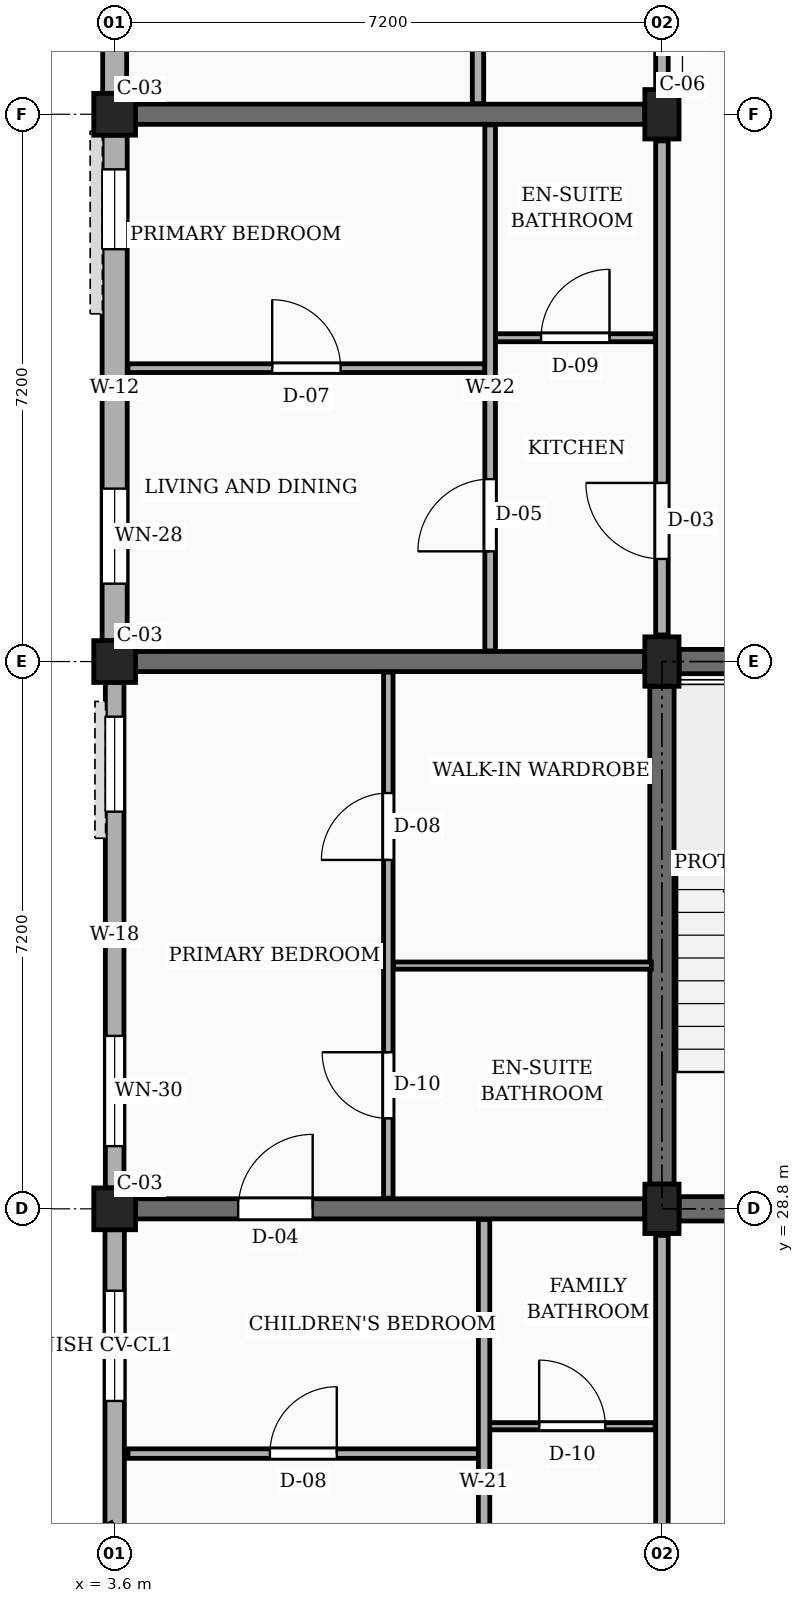
"""IFC4 building model, lengths in metres.
Left out: names, types, materials, properties, quantities, classifications, styles, units other than length and angle.
Written with IfcOpenShell. Run it as: python <this file> out.ifc"""

import sys

from ifc_helpers import new_model, si_unit, direction, frame, frame_2d, origin, origin_2d, place, context, subcontext, project, spatial, rectangle, extrude, element, fill, save


model = new_model("IFC4")
c1 = context("Model", 3, precision=1e-05, world=origin(), true_north=direction((0.0, 1.0)))
c2 = subcontext(c1, "Body", "Model", "MODEL_VIEW")
j1 = project(units=[si_unit("LENGTHUNIT", "METRE"), si_unit("PLANEANGLEUNIT", "RADIAN")], contexts=[c1])
p1 = place(None, origin())
s1 = spatial("IfcSite", under=j1, at=p1, CompositionType="ELEMENT")
p2 = place(p1, origin())
s2 = spatial("IfcBuilding", under=s1, at=p2, CompositionType="ELEMENT")
p3 = place(p2, frame((0.0, 0.0, 10.8)))
s3 = spatial("IfcBuildingStorey", under=s2, at=p3, CompositionType="ELEMENT", Elevation=10.8)
for number, where, z_axis, x_axis in (
    (1, (3.6, 28.8, 0.0), (0.0, 0.0, 1.0), (1.0, 0.0, 0.0)),
    (2, (3.6, 36.0, 0.0), (0.0, 0.0, 1.0), (1.0, 0.0, 0.0)),
    (3, (3.6, 43.2, 0.0), (0.0, 0.0, 1.0), (1.0, 0.0, 0.0)),
):
    element("IfcColumn", number, at=place(p3, frame(where, z_axis=z_axis, x_axis=x_axis)), inside=s3, PredefinedType="COLUMN", context=c2, shape_type="SweptSolid", body=[
        extrude(rectangle(XDim=0.55, YDim=0.55, at=origin_2d()), origin(), (0.0, 0.0, 1.0), 3.15),
    ])
for number, where, z_axis, x_axis in (
    (4, (10.8, 28.8, 0.0), (0.0, 0.0, 1.0), (1.0, 0.0, 0.0)),
    (5, (10.8, 36.0, 0.0), (0.0, 0.0, 1.0), (1.0, 0.0, 0.0)),
    (6, (10.8, 43.2, 0.0), (0.0, 0.0, 1.0), (1.0, 0.0, 0.0)),
):
    element("IfcColumn", number, at=place(p3, frame(where, z_axis=z_axis, x_axis=x_axis)), inside=s3, PredefinedType="COLUMN", context=c2, shape_type="SweptSolid", body=[
        extrude(rectangle(XDim=0.45, YDim=0.65, at=origin_2d()), origin(), (0.0, 0.0, 1.0), 3.15),
    ])
p4 = place(p3, frame((3.875, 28.8, 0.0), z_axis=(0.0, 0.0, 1.0), x_axis=(1.0, 0.0, 0.0)))
e7 = element("IfcWall", 7, at=p4, inside=s3, PredefinedType="SOLIDWALL", context=c2, shape_type="SweptSolid", body=[
    extrude(rectangle(XDim=6.7, YDim=0.265, at=frame_2d((3.35, 0.0))), origin(), (0.0, 0.0, 1.0), 2.17),
])
p5 = place(p4, frame((1.35, 0.0, 0.0)))
e8 = element("IfcOpeningElement", 8, at=p5, cuts=e7, PredefinedType="OPENING", context=c2, shape_type="SweptSolid", body=[
    extrude(rectangle(XDim=0.98, YDim=2.12, at=frame_2d((0.49, 1.06))), frame((0.0, 0.143, 0.0), z_axis=(0.0, -1.0, 0.0), x_axis=(1.0, 0.0, 0.0)), (0.0, 0.0, 1.0), 0.285),
])
for number, where, z_axis, x_axis in (
    (9, (3.875, 36.0, 0.0), (0.0, 0.0, 1.0), (1.0, 0.0, 0.0)),
    (10, (3.875, 43.2, 0.0), (0.0, 0.0, 1.0), (1.0, 0.0, 0.0)),
):
    element("IfcWall", number, at=place(p3, frame(where, z_axis=z_axis, x_axis=x_axis)), inside=s3, PredefinedType="SOLIDWALL", context=c2, shape_type="SweptSolid", body=[
        extrude(rectangle(XDim=6.7, YDim=0.265, at=frame_2d((3.35, 0.0))), origin(), (0.0, 0.0, 1.0), 2.17),
    ])
p6 = place(p3, frame((3.6, 50.125, 0.0), z_axis=(0.0, 0.0, 1.0), x_axis=(0.0, -1.0, 0.0)))
e11 = element("IfcWall", 11, at=p6, inside=s3, PredefinedType="SOLIDWALL", context=c2, shape_type="SweptSolid", body=[
    extrude(rectangle(XDim=6.65, YDim=0.315, at=frame_2d((3.325, 0.0))), origin(), (0.0, 0.0, 1.0), 2.44),
])
p7 = place(p6, frame((0.45, 0.0, 0.78)))
e12 = element("IfcOpeningElement", 12, at=p7, cuts=e11, PredefinedType="OPENING", context=c2, shape_type="SweptSolid", body=[
    extrude(rectangle(XDim=1.46, YDim=1.36, at=frame_2d((0.73, 0.68))), frame((0.0, 0.167, 0.0), z_axis=(0.0, -1.0, 0.0), x_axis=(1.0, 0.0, 0.0)), (0.0, 0.0, 1.0), 0.335),
])
p8 = place(p6, frame((4.65, 0.0, 0.78)))
e13 = element("IfcOpeningElement", 13, at=p8, cuts=e11, PredefinedType="OPENING", context=c2, shape_type="SweptSolid", body=[
    extrude(rectangle(XDim=1.05, YDim=1.44, at=frame_2d((0.525, 0.72))), frame((0.0, 0.167, 0.0), z_axis=(0.0, -1.0, 0.0), x_axis=(1.0, 0.0, 0.0)), (0.0, 0.0, 1.0), 0.335),
])
p9 = place(p3, frame((3.6, 42.925, 0.0), z_axis=(0.0, 0.0, 1.0), x_axis=(0.0, -1.0, 0.0)))
e14 = element("IfcWall", 14, at=p9, inside=s3, PredefinedType="SOLIDWALL", context=c2, shape_type="SweptSolid", body=[
    extrude(rectangle(XDim=6.65, YDim=0.33, at=frame_2d((3.325, 0.0))), origin(), (0.0, 0.0, 1.0), 2.44),
])
p10 = place(p9, frame((0.45, 0.0, 0.78)))
e15 = element("IfcOpeningElement", 15, at=p10, cuts=e14, PredefinedType="OPENING", context=c2, shape_type="SweptSolid", body=[
    extrude(rectangle(XDim=1.05, YDim=1.44, at=frame_2d((0.525, 0.72))), frame((0.0, 0.175, 0.0), z_axis=(0.0, -1.0, 0.0), x_axis=(1.0, 0.0, 0.0)), (0.0, 0.0, 1.0), 0.35),
])
p11 = place(p9, frame((4.65, 0.0, 0.78)))
e16 = element("IfcOpeningElement", 16, at=p11, cuts=e14, PredefinedType="OPENING", context=c2, shape_type="SweptSolid", body=[
    extrude(rectangle(XDim=1.25, YDim=1.44, at=frame_2d((0.625, 0.72))), frame((0.0, 0.175, 0.0), z_axis=(0.0, -1.0, 0.0), x_axis=(1.0, 0.0, 0.0)), (0.0, 0.0, 1.0), 0.35),
])
p12 = place(p3, frame((3.6, 35.725, 0.0), z_axis=(0.0, 0.0, 1.0), x_axis=(0.0, -1.0, 0.0)))
e17 = element("IfcWall", 17, at=p12, inside=s3, PredefinedType="SOLIDWALL", context=c2, shape_type="SweptSolid", body=[
    extrude(rectangle(XDim=6.65, YDim=0.245, at=frame_2d((3.325, 0.0))), origin(), (0.0, 0.0, 1.0), 2.44),
])
p13 = place(p12, frame((0.45, 0.0, 0.78)))
e18 = element("IfcOpeningElement", 18, at=p13, cuts=e17, PredefinedType="OPENING", context=c2, shape_type="SweptSolid", body=[
    extrude(rectangle(XDim=1.25, YDim=1.44, at=frame_2d((0.625, 0.72))), frame((0.0, 0.133, 0.0), z_axis=(0.0, -1.0, 0.0), x_axis=(1.0, 0.0, 0.0)), (0.0, 0.0, 1.0), 0.265),
])
p14 = place(p12, frame((4.65, 0.0, 0.78)))
e19 = element("IfcOpeningElement", 19, at=p14, cuts=e17, PredefinedType="OPENING", context=c2, shape_type="SweptSolid", body=[
    extrude(rectangle(XDim=1.45, YDim=1.44, at=frame_2d((0.725, 0.72))), frame((0.0, 0.133, 0.0), z_axis=(0.0, -1.0, 0.0), x_axis=(1.0, 0.0, 0.0)), (0.0, 0.0, 1.0), 0.265),
])
p15 = place(p3, frame((3.6, 28.525, 0.0), z_axis=(0.0, 0.0, 1.0), x_axis=(0.0, -1.0, 0.0)))
e20 = element("IfcWall", 20, at=p15, inside=s3, PredefinedType="SOLIDWALL", context=c2, shape_type="SweptSolid", body=[
    extrude(rectangle(XDim=3.905, YDim=0.255, at=frame_2d((1.952, 0.0))), origin(), (0.0, 0.0, 1.0), 2.44),
])
p16 = place(p15, frame((0.802, 0.0, 0.78)))
e21 = element("IfcOpeningElement", 21, at=p16, cuts=e20, PredefinedType="OPENING", context=c2, shape_type="SweptSolid", body=[
    extrude(rectangle(XDim=1.45, YDim=1.44, at=frame_2d((0.725, 0.72))), frame((0.0, 0.137, 0.0), z_axis=(0.0, -1.0, 0.0), x_axis=(1.0, 0.0, 0.0)), (0.0, 0.0, 1.0), 0.275),
])
p17 = place(p3, frame((10.8, 29.125, 0.0), z_axis=(0.0, 0.0, 1.0), x_axis=(0.0, 1.0, 0.0)))
e22 = element("IfcWall", 22, at=p17, inside=s3, PredefinedType="SHEAR", context=c2, shape_type="SweptSolid", body=[
    extrude(rectangle(XDim=6.55, YDim=0.32, at=frame_2d((3.275, 0.0))), origin(), (0.0, 0.0, 1.0), 2.87),
])
for number, where, z_axis, x_axis in (
    (23, (11.025, 36.0, 0.0), (0.0, 0.0, 1.0), (1.0, 0.0, 0.0)),
    (24, (11.025, 28.8, 0.0), (0.0, 0.0, 1.0), (1.0, 0.0, 0.0)),
):
    element("IfcWall", number, at=place(p3, frame(where, z_axis=z_axis, x_axis=x_axis)), inside=s3, PredefinedType="SHEAR", context=c2, shape_type="SweptSolid", body=[
        extrude(rectangle(XDim=6.75, YDim=0.32, at=frame_2d((3.375, 0.0))), origin(), (0.0, 0.0, 1.0), 2.87),
    ])
p18 = place(p3, frame((10.8, 21.95, 0.0), z_axis=(0.0, 0.0, 1.0), x_axis=(0.0, 1.0, 0.0)))
e25 = element("IfcWall", 25, at=p18, inside=s3, PredefinedType="PARTITIONING", context=c2, shape_type="SweptSolid", body=[
    extrude(rectangle(XDim=6.5, YDim=0.165, at=frame_2d((3.25, 0.0))), origin(), (0.0, 0.0, 1.0), 2.22),
])
p19 = place(p18, frame((1.0, 0.0, 0.0)))
e26 = element("IfcOpeningElement", 26, at=p19, cuts=e25, PredefinedType="OPENING", context=c2, shape_type="SweptSolid", body=[
    extrude(rectangle(XDim=1.14, YDim=2.18, at=frame_2d((0.57, 1.09))), frame((0.0, 0.093, 0.0), z_axis=(0.0, -1.0, 0.0), x_axis=(1.0, 0.0, 0.0)), (0.0, 0.0, 1.0), 0.185),
])
p20 = place(p3, frame((10.8, 36.35, 0.0), z_axis=(0.0, 0.0, 1.0), x_axis=(0.0, 1.0, 0.0)))
e27 = element("IfcWall", 27, at=p20, inside=s3, PredefinedType="PARTITIONING", context=c2, shape_type="SweptSolid", body=[
    extrude(rectangle(XDim=6.5, YDim=0.165, at=frame_2d((3.25, 0.0))), origin(), (0.0, 0.0, 1.0), 2.22),
])
p21 = place(p20, frame((1.0, 0.0, 0.0)))
e28 = element("IfcOpeningElement", 28, at=p21, cuts=e27, PredefinedType="OPENING", context=c2, shape_type="SweptSolid", body=[
    extrude(rectangle(XDim=1.0, YDim=2.15, at=frame_2d((0.5, 1.075))), frame((0.0, 0.093, 0.0), z_axis=(0.0, -1.0, 0.0), x_axis=(1.0, 0.0, 0.0)), (0.0, 0.0, 1.0), 0.185),
])
p22 = place(p3, frame((10.8, 43.55, 0.0), z_axis=(0.0, 0.0, 1.0), x_axis=(0.0, 1.0, 0.0)))
e29 = element("IfcWall", 29, at=p22, inside=s3, PredefinedType="PARTITIONING", context=c2, shape_type="SweptSolid", body=[
    extrude(rectangle(XDim=6.5, YDim=0.165, at=frame_2d((3.25, 0.0))), origin(), (0.0, 0.0, 1.0), 2.22),
])
p23 = place(p22, frame((1.0, 0.0, 0.0)))
e30 = element("IfcOpeningElement", 30, at=p23, cuts=e29, PredefinedType="OPENING", context=c2, shape_type="SweptSolid", body=[
    extrude(rectangle(XDim=0.94, YDim=2.12, at=frame_2d((0.47, 1.06))), frame((0.0, 0.093, 0.0), z_axis=(0.0, -1.0, 0.0), x_axis=(1.0, 0.0, 0.0)), (0.0, 0.0, 1.0), 0.185),
])
p24 = place(p3, frame((3.775, 25.58, 0.0), z_axis=(0.0, 0.0, 1.0), x_axis=(1.0, 0.0, 0.0)))
e31 = element("IfcWall", 31, at=p24, inside=s3, PredefinedType="PARTITIONING", context=c2, shape_type="SweptSolid", body=[
    extrude(rectangle(XDim=4.615, YDim=0.125, at=frame_2d((2.308, 0.0))), origin(), (0.0, 0.0, 1.0), 2.305),
])
p25 = place(p24, frame((1.867, 0.0, 0.0)))
e32 = element("IfcOpeningElement", 32, at=p25, cuts=e31, PredefinedType="OPENING", context=c2, shape_type="SweptSolid", body=[
    extrude(rectangle(XDim=0.88, YDim=2.08, at=frame_2d((0.44, 1.04))), frame((0.0, 0.073, 0.0), z_axis=(0.0, -1.0, 0.0), x_axis=(1.0, 0.0, 0.0)), (0.0, 0.0, 1.0), 0.145),
])
p26 = place(p3, frame((8.53, 25.94, 0.0), z_axis=(0.0, 0.0, 1.0), x_axis=(1.0, 0.0, 0.0)))
e33 = element("IfcWall", 33, at=p26, inside=s3, PredefinedType="PARTITIONING", context=c2, shape_type="SweptSolid", body=[
    extrude(rectangle(XDim=2.18, YDim=0.095, at=frame_2d((1.09, 0.0))), origin(), (0.0, 0.0, 1.0), 2.305),
])
p27 = place(p26, frame((0.655, 0.0, 0.0)))
e34 = element("IfcOpeningElement", 34, at=p27, cuts=e33, PredefinedType="OPENING", context=c2, shape_type="SweptSolid", body=[
    extrude(rectangle(XDim=0.87, YDim=2.05, at=frame_2d((0.435, 1.025))), frame((0.0, 0.058, 0.0), z_axis=(0.0, -1.0, 0.0), x_axis=(1.0, 0.0, 0.0)), (0.0, 0.0, 1.0), 0.115),
])
p28 = place(p3, frame((8.46, 21.74, 0.0), z_axis=(0.0, 0.0, 1.0), x_axis=(0.0, 1.0, 0.0)))
e35 = element("IfcWall", 35, at=p28, inside=s3, PredefinedType="PARTITIONING", context=c2, shape_type="SweptSolid", body=[
    extrude(rectangle(XDim=6.92, YDim=0.15, at=frame_2d((3.46, 0.0))), origin(), (0.0, 0.0, 1.0), 2.305),
])
p29 = place(p28, frame((1.31, 0.0, 0.0)))
e36 = element("IfcOpeningElement", 36, at=p29, cuts=e35, PredefinedType="OPENING", context=c2, shape_type="SweptSolid", body=[
    extrude(rectangle(XDim=0.92, YDim=2.1, at=frame_2d((0.46, 1.05))), frame((0.0, 0.085, 0.0), z_axis=(0.0, -1.0, 0.0), x_axis=(1.0, 0.0, 0.0)), (0.0, 0.0, 1.0), 0.17),
])
p30 = place(p3, frame((7.2, 28.94, 0.0), z_axis=(0.0, 0.0, 1.0), x_axis=(0.0, 1.0, 0.0)))
e37 = element("IfcWall", 37, at=p30, inside=s3, PredefinedType="PARTITIONING", context=c2, shape_type="SweptSolid", body=[
    extrude(rectangle(XDim=6.92, YDim=0.125, at=frame_2d((3.46, 0.0))), origin(), (0.0, 0.0, 1.0), 2.305),
])
p31 = place(p30, frame((1.05, 0.0, 0.0)))
e38 = element("IfcOpeningElement", 38, at=p31, cuts=e37, PredefinedType="OPENING", context=c2, shape_type="SweptSolid", body=[
    extrude(rectangle(XDim=0.87, YDim=2.05, at=frame_2d((0.435, 1.025))), frame((0.0, 0.073, 0.0), z_axis=(0.0, -1.0, 0.0), x_axis=(1.0, 0.0, 0.0)), (0.0, 0.0, 1.0), 0.145),
])
p32 = place(p30, frame((4.45, 0.0, 0.0)))
e39 = element("IfcOpeningElement", 39, at=p32, cuts=e37, PredefinedType="OPENING", context=c2, shape_type="SweptSolid", body=[
    extrude(rectangle(XDim=0.88, YDim=2.08, at=frame_2d((0.44, 1.04))), frame((0.0, 0.073, 0.0), z_axis=(0.0, -1.0, 0.0), x_axis=(1.0, 0.0, 0.0)), (0.0, 0.0, 1.0), 0.145),
])
p33 = place(p3, frame((7.27, 32.0, 0.0), z_axis=(0.0, 0.0, 1.0), x_axis=(1.0, 0.0, 0.0)))
e40 = element("IfcWall", 40, at=p33, inside=s3, PredefinedType="PARTITIONING", context=c2, shape_type="SweptSolid", body=[
    extrude(rectangle(XDim=3.39, YDim=0.095, at=frame_2d((1.695, 0.0))), origin(), (0.0, 0.0, 1.0), 2.305),
])
p34 = place(p3, frame((3.775, 39.86, 0.0), z_axis=(0.0, 0.0, 1.0), x_axis=(1.0, 0.0, 0.0)))
e41 = element("IfcWall", 41, at=p34, inside=s3, PredefinedType="PARTITIONING", context=c2, shape_type="SweptSolid", body=[
    extrude(rectangle(XDim=4.695, YDim=0.115, at=frame_2d((2.348, 0.0))), origin(), (0.0, 0.0, 1.0), 2.305),
])
p35 = place(p34, frame((1.897, 0.0, 0.0)))
e42 = element("IfcOpeningElement", 42, at=p35, cuts=e41, PredefinedType="OPENING", context=c2, shape_type="SweptSolid", body=[
    extrude(rectangle(XDim=0.9, YDim=2.1, at=frame_2d((0.45, 1.05))), frame((0.0, 0.067, 0.0), z_axis=(0.0, -1.0, 0.0), x_axis=(1.0, 0.0, 0.0)), (0.0, 0.0, 1.0), 0.135),
])
p36 = place(p3, frame((8.61, 40.26, 0.0), z_axis=(0.0, 0.0, 1.0), x_axis=(1.0, 0.0, 0.0)))
e43 = element("IfcWall", 43, at=p36, inside=s3, PredefinedType="PARTITIONING", context=c2, shape_type="SweptSolid", body=[
    extrude(rectangle(XDim=2.1, YDim=0.105, at=frame_2d((1.05, 0.0))), origin(), (0.0, 0.0, 1.0), 2.305),
])
p37 = place(p36, frame((0.6, 0.0, 0.0)))
e44 = element("IfcOpeningElement", 44, at=p37, cuts=e43, PredefinedType="OPENING", context=c2, shape_type="SweptSolid", body=[
    extrude(rectangle(XDim=0.9, YDim=2.05, at=frame_2d((0.45, 1.025))), frame((0.0, 0.062, 0.0), z_axis=(0.0, -1.0, 0.0), x_axis=(1.0, 0.0, 0.0)), (0.0, 0.0, 1.0), 0.125),
])
p38 = place(p3, frame((8.54, 36.14, 0.0), z_axis=(0.0, 0.0, 1.0), x_axis=(0.0, 1.0, 0.0)))
e45 = element("IfcWall", 45, at=p38, inside=s3, PredefinedType="PARTITIONING", context=c2, shape_type="SweptSolid", body=[
    extrude(rectangle(XDim=6.92, YDim=0.14, at=frame_2d((3.46, 0.0))), origin(), (0.0, 0.0, 1.0), 2.305),
])
p39 = place(p38, frame((1.31, 0.0, 0.0)))
e46 = element("IfcOpeningElement", 46, at=p39, cuts=e45, PredefinedType="OPENING", context=c2, shape_type="SweptSolid", body=[
    extrude(rectangle(XDim=0.95, YDim=2.1, at=frame_2d((0.475, 1.05))), frame((0.0, 0.08, 0.0), z_axis=(0.0, -1.0, 0.0), x_axis=(1.0, 0.0, 0.0)), (0.0, 0.0, 1.0), 0.16),
])
p40 = place(p3, frame((8.38, 43.34, 0.0), z_axis=(0.0, 0.0, 1.0), x_axis=(0.0, 1.0, 0.0)))
e47 = element("IfcWall", 47, at=p40, inside=s3, PredefinedType="PARTITIONING", context=c2, shape_type="SweptSolid", body=[
    extrude(rectangle(XDim=6.885, YDim=0.15, at=frame_2d((3.442, 0.0))), origin(), (0.0, 0.0, 1.0), 2.305),
])
p41 = place(p40, frame((1.31, 0.0, 0.0)))
e48 = element("IfcOpeningElement", 48, at=p41, cuts=e47, PredefinedType="OPENING", context=c2, shape_type="SweptSolid", body=[
    extrude(rectangle(XDim=0.92, YDim=2.1, at=frame_2d((0.46, 1.05))), frame((0.0, 0.085, 0.0), z_axis=(0.0, -1.0, 0.0), x_axis=(1.0, 0.0, 0.0)), (0.0, 0.0, 1.0), 0.17),
])
p42 = place(p10, origin())
e49 = element("IfcWindow", 49, at=p42, inside=s3, PartitioningType="SINGLE_PANEL", PredefinedType="WINDOW", context=c2, shape_type="SweptSolid", body=[
    extrude(rectangle(XDim=1.05, YDim=1.44, at=frame_2d((0.525, 0.72))), frame((0.0, 0.03, 0.0), z_axis=(0.0, -1.0, 0.0), x_axis=(1.0, 0.0, 0.0)), (0.0, 0.0, 1.0), 0.06),
])
fill(e15, e49)
p43 = place(p11, origin())
e50 = element("IfcWindow", 50, at=p43, inside=s3, PartitioningType="SINGLE_PANEL", PredefinedType="WINDOW", context=c2, shape_type="SweptSolid", body=[
    extrude(rectangle(XDim=1.25, YDim=1.44, at=frame_2d((0.625, 0.72))), frame((0.0, 0.03, 0.0), z_axis=(0.0, -1.0, 0.0), x_axis=(1.0, 0.0, 0.0)), (0.0, 0.0, 1.0), 0.06),
])
fill(e16, e50)
p44 = place(p13, origin())
e51 = element("IfcWindow", 51, at=p44, inside=s3, PartitioningType="SINGLE_PANEL", PredefinedType="WINDOW", context=c2, shape_type="SweptSolid", body=[
    extrude(rectangle(XDim=1.25, YDim=1.44, at=frame_2d((0.625, 0.72))), frame((0.0, 0.03, 0.0), z_axis=(0.0, -1.0, 0.0), x_axis=(1.0, 0.0, 0.0)), (0.0, 0.0, 1.0), 0.06),
])
fill(e18, e51)
p45 = place(p14, origin())
e52 = element("IfcWindow", 52, at=p45, inside=s3, PartitioningType="SINGLE_PANEL", PredefinedType="WINDOW", context=c2, shape_type="SweptSolid", body=[
    extrude(rectangle(XDim=1.45, YDim=1.44, at=frame_2d((0.725, 0.72))), frame((0.0, 0.03, 0.0), z_axis=(0.0, -1.0, 0.0), x_axis=(1.0, 0.0, 0.0)), (0.0, 0.0, 1.0), 0.06),
])
fill(e19, e52)
p46 = place(p16, origin())
e53 = element("IfcWindow", 53, at=p46, inside=s3, PartitioningType="SINGLE_PANEL", PredefinedType="WINDOW", context=c2, shape_type="SweptSolid", body=[
    extrude(rectangle(XDim=1.45, YDim=1.44, at=frame_2d((0.725, 0.72))), frame((0.0, 0.03, 0.0), z_axis=(0.0, -1.0, 0.0), x_axis=(1.0, 0.0, 0.0)), (0.0, 0.0, 1.0), 0.06),
])
fill(e21, e53)
p47 = place(p21, origin())
e54 = element("IfcDoor", 54, at=p47, inside=s3, OperationType="SINGLE_SWING_RIGHT", PredefinedType="DOOR", context=c2, shape_type="SweptSolid", body=[
    extrude(rectangle(XDim=1.0, YDim=2.15, at=frame_2d((0.5, 1.075))), frame((0.0, 0.025, 0.0), z_axis=(0.0, -1.0, 0.0), x_axis=(1.0, 0.0, 0.0)), (0.0, 0.0, 1.0), 0.05),
])
fill(e28, e54)
p48 = place(p25, origin())
e55 = element("IfcDoor", 55, at=p48, inside=s3, OperationType="SINGLE_SWING_RIGHT", PredefinedType="DOOR", context=c2, shape_type="SweptSolid", body=[
    extrude(rectangle(XDim=0.88, YDim=2.08, at=frame_2d((0.44, 1.04))), frame((0.0, 0.025, 0.0), z_axis=(0.0, -1.0, 0.0), x_axis=(1.0, 0.0, 0.0)), (0.0, 0.0, 1.0), 0.05),
])
fill(e32, e55)
p49 = place(p27, origin())
e56 = element("IfcDoor", 56, at=p49, inside=s3, OperationType="SINGLE_SWING_LEFT", PredefinedType="DOOR", context=c2, shape_type="SweptSolid", body=[
    extrude(rectangle(XDim=0.87, YDim=2.05, at=frame_2d((0.435, 1.025))), frame((0.0, 0.025, 0.0), z_axis=(0.0, -1.0, 0.0), x_axis=(1.0, 0.0, 0.0)), (0.0, 0.0, 1.0), 0.05),
])
fill(e34, e56)
p50 = place(p31, origin())
e57 = element("IfcDoor", 57, at=p50, inside=s3, OperationType="SINGLE_SWING_RIGHT", PredefinedType="DOOR", context=c2, shape_type="SweptSolid", body=[
    extrude(rectangle(XDim=0.87, YDim=2.05, at=frame_2d((0.435, 1.025))), frame((0.0, 0.025, 0.0), z_axis=(0.0, -1.0, 0.0), x_axis=(1.0, 0.0, 0.0)), (0.0, 0.0, 1.0), 0.05),
])
fill(e38, e57)
p51 = place(p32, origin())
e58 = element("IfcDoor", 58, at=p51, inside=s3, OperationType="SINGLE_SWING_LEFT", PredefinedType="DOOR", context=c2, shape_type="SweptSolid", body=[
    extrude(rectangle(XDim=0.88, YDim=2.08, at=frame_2d((0.44, 1.04))), frame((0.0, 0.025, 0.0), z_axis=(0.0, -1.0, 0.0), x_axis=(1.0, 0.0, 0.0)), (0.0, 0.0, 1.0), 0.05),
])
fill(e39, e58)
p52 = place(p35, origin())
e59 = element("IfcDoor", 59, at=p52, inside=s3, OperationType="SINGLE_SWING_LEFT", PredefinedType="DOOR", context=c2, shape_type="SweptSolid", body=[
    extrude(rectangle(XDim=0.9, YDim=2.1, at=frame_2d((0.45, 1.05))), frame((0.0, 0.025, 0.0), z_axis=(0.0, -1.0, 0.0), x_axis=(1.0, 0.0, 0.0)), (0.0, 0.0, 1.0), 0.05),
])
fill(e42, e59)
p53 = place(p37, origin())
e60 = element("IfcDoor", 60, at=p53, inside=s3, OperationType="SINGLE_SWING_RIGHT", PredefinedType="DOOR", context=c2, shape_type="SweptSolid", body=[
    extrude(rectangle(XDim=0.9, YDim=2.05, at=frame_2d((0.45, 1.025))), frame((0.0, 0.025, 0.0), z_axis=(0.0, -1.0, 0.0), x_axis=(1.0, 0.0, 0.0)), (0.0, 0.0, 1.0), 0.05),
])
fill(e44, e60)
p54 = place(p39, origin())
e61 = element("IfcDoor", 61, at=p54, inside=s3, OperationType="SINGLE_SWING_LEFT", PredefinedType="DOOR", context=c2, shape_type="SweptSolid", body=[
    extrude(rectangle(XDim=0.95, YDim=2.1, at=frame_2d((0.475, 1.05))), frame((0.0, 0.025, 0.0), z_axis=(0.0, -1.0, 0.0), x_axis=(1.0, 0.0, 0.0)), (0.0, 0.0, 1.0), 0.05),
])
fill(e46, e61)
p55 = place(p5, origin())
e62 = element("IfcDoor", 62, at=p55, inside=s3, OperationType="SINGLE_SWING_RIGHT", PredefinedType="DOOR", context=c2, shape_type="SweptSolid", body=[
    extrude(rectangle(XDim=0.98, YDim=2.12, at=frame_2d((0.49, 1.06))), frame((0.0, 0.025, 0.0), z_axis=(0.0, -1.0, 0.0), x_axis=(1.0, 0.0, 0.0)), (0.0, 0.0, 1.0), 0.05),
])
fill(e8, e62)
save(model, sys.argv[1])
